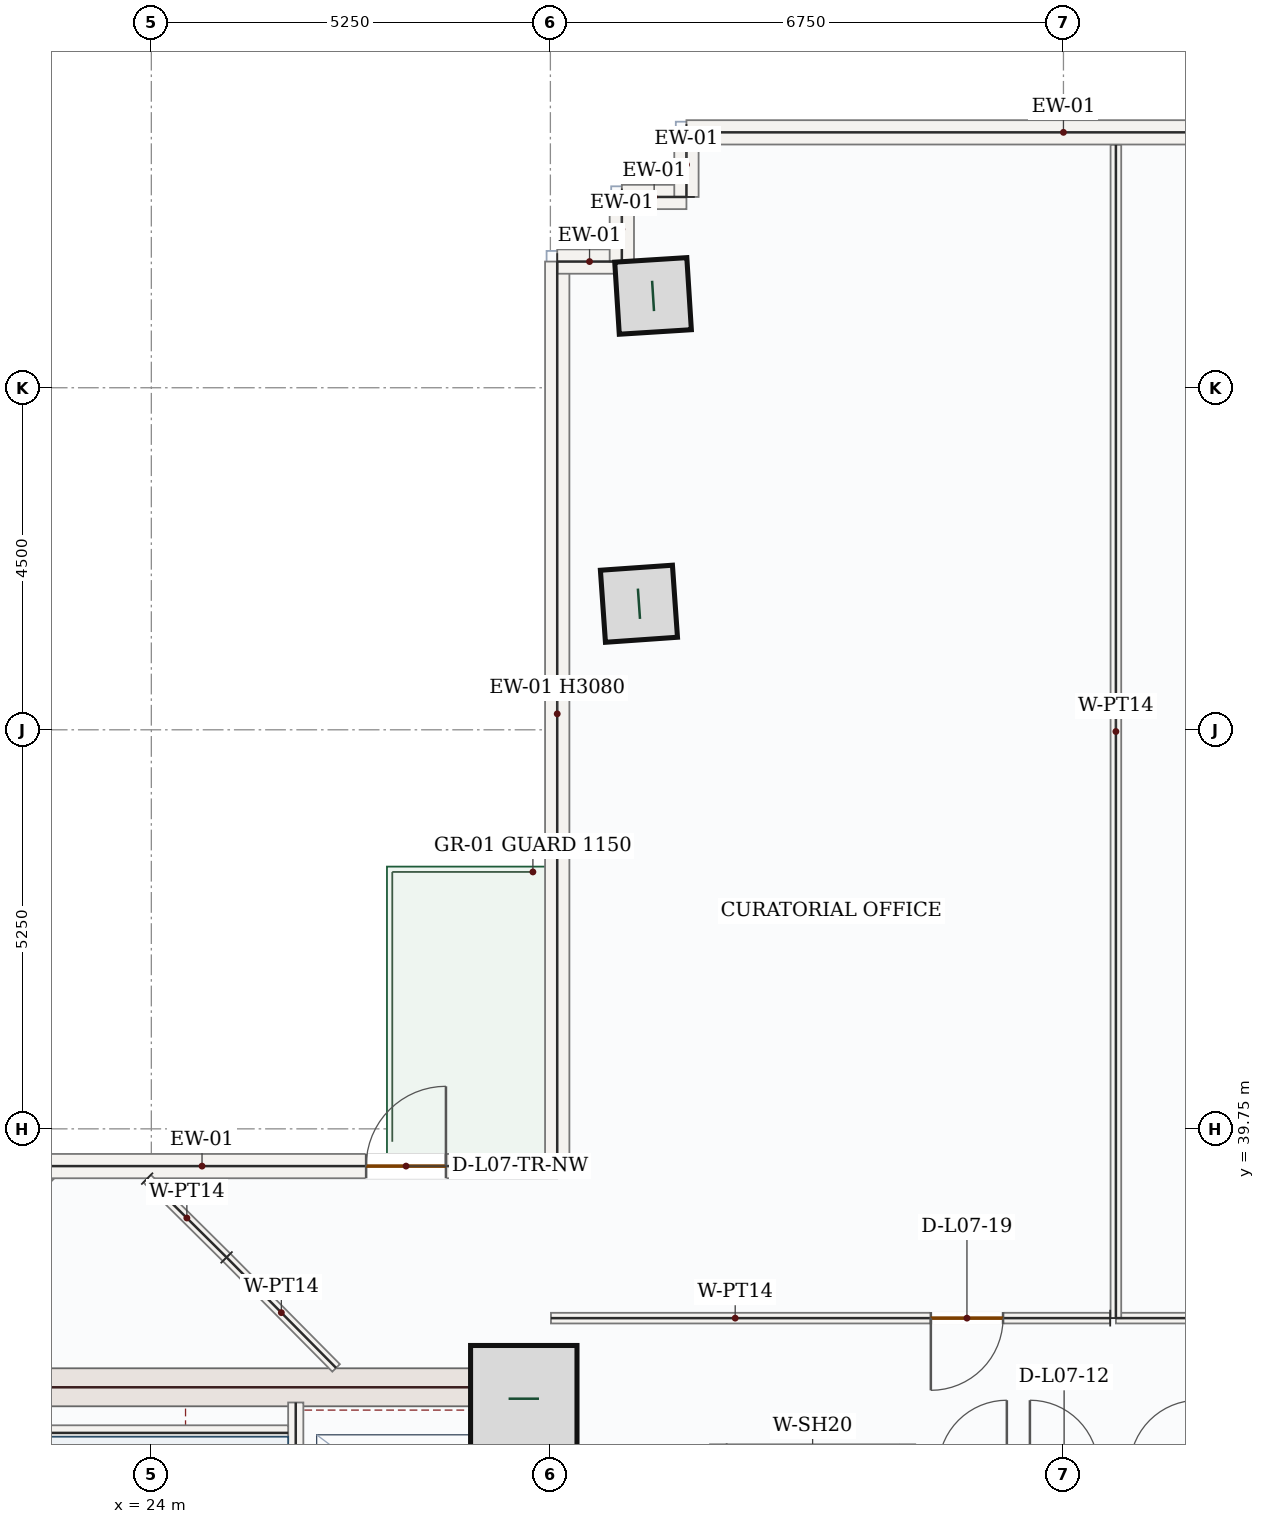
"""IFC4 building model, lengths in metres.
Left out: names, types, materials, properties, quantities, classifications, styles, units other than length and angle.
Written with IfcOpenShell. Run it as: python <this file> out.ifc"""

import sys

from ifc_helpers import new_model, si_unit, direction, frame, frame_2d, origin, origin_2d, place, context, subcontext, project, spatial, rectangle, hollow_rectangle, extrude, source, transform, mapped, element, fill, save


model = new_model("IFC4")
c1 = context("Model", 3, precision=1e-05, world=origin(), true_north=direction((0.0, 1.0)))
c2 = subcontext(c1, "Body", "Model", "MODEL_VIEW")
j1 = project(units=[si_unit("LENGTHUNIT", "METRE"), si_unit("PLANEANGLEUNIT", "RADIAN")], contexts=[c1])
p1 = place(None, origin())
s1 = spatial("IfcSite", under=j1, at=p1, CompositionType="ELEMENT")
p2 = place(p1, origin())
s2 = spatial("IfcBuilding", under=s1, at=p2, CompositionType="ELEMENT")
p3 = place(p2, frame((0.0, 0.0, 37.5)))
s3 = spatial("IfcBuildingStorey", under=s2, at=p3, CompositionType="ELEMENT", Elevation=37.5)
p4 = place(p3, frame((29.0, 28.05, 0.0), z_axis=(0.0, 0.0, 1.0), x_axis=(0.0, 1.0, 0.0)))
e1 = element("IfcWall", 1, at=p4, inside=s3, PredefinedType="SHEAR", context=c2, shape_type="SweptSolid", body=[
    extrude(rectangle(XDim=8.55, YDim=0.5, at=frame_2d((4.275, 0.0))), origin(), (0.0, 0.0, 1.0), 3.95),
])
p5 = place(p4, frame((1.5, 0.0, 0.0)))
e2 = element("IfcOpeningElement", 2, at=p5, cuts=e1, PredefinedType="OPENING", context=c2, shape_type="SweptSolid", body=[
    extrude(rectangle(XDim=1.1, YDim=2.2, at=frame_2d((0.55, 1.1))), frame((0.0, 0.26, 0.0), z_axis=(0.0, -1.0, 0.0), x_axis=(1.0, 0.0, 0.0)), (0.0, 0.0, 1.0), 0.52),
])
m1 = source(origin(), c2, "Body", "SweptSolid", [
    extrude(rectangle(XDim=7.0, YDim=0.5, at=frame_2d((3.5, 0.0))), origin(), (0.0, 0.0, 1.0), 3.95),
])
p6 = place(p3, frame((21.75, 36.35, 0.0), z_axis=(0.0, 0.0, 1.0), x_axis=(1.0, 0.0, 0.0)))
e3 = element("IfcWall", 3, at=p6, inside=s3, PredefinedType="SHEAR", context=c2, shape_type="MappedRepresentation", body=[
    mapped(m1, transform((0.0, 0.0, 0.0), x_axis=(1.0, 0.0, 0.0), y_axis=(0.0, 1.0, 0.0), z_axis=(0.0, 0.0, 1.0), scale=1.0)),
])
m2 = source(origin(), c2, "Body", "SweptSolid", [
    extrude(rectangle(XDim=1.4, YDim=1.4, at=origin_2d()), origin(), (0.0, 0.0, 1.0), 4.2),
])
p7 = place(p3, frame((28.9, 36.2, 0.0), z_axis=(0.0, 0.0, 1.0), x_axis=(1.0, 0.0, 0.0)))
e4 = element("IfcColumn", 4, at=p7, inside=s3, PredefinedType="COLUMN", context=c2, shape_type="MappedRepresentation", body=[
    mapped(m2, transform((0.0, 0.0, 0.0), x_axis=(1.0, 0.0, 0.0), y_axis=(0.0, 1.0, 0.0), z_axis=(0.0, 0.0, 1.0), scale=1.0)),
])
m3 = source(origin(), c2, "Body", "SweptSolid", [
    extrude(hollow_rectangle(XDim=0.95, YDim=0.95, WallThickness=0.05, at=origin_2d()), origin(), (0.0, 0.0, 1.0), 4.2),
])
for number, where, z_axis, x_axis in (
    (5, (30.415, 46.658, 0.0), (0.0, 0.0, 1.0), (-0.07, 0.998, 0.0)),
    (6, (30.601, 50.708, 0.0), (0.0, 0.0, 1.0), (-0.063, 0.998, 0.0)),
):
    element("IfcColumn", number, at=place(p3, frame(where, z_axis=z_axis, x_axis=x_axis)), inside=s3, PredefinedType="COLUMN", context=c2, shape_type="MappedRepresentation", body=[
        mapped(m3, transform((0.0, 0.0, 0.0), x_axis=(1.0, 0.0, 0.0), y_axis=(0.0, 1.0, 0.0), z_axis=(0.0, 0.0, 1.0), scale=1.0)),
    ])
m4 = source(origin(), c2, "Body", "SweptSolid", [
    extrude(rectangle(XDim=5.258, YDim=0.32, at=frame_2d((2.629, 0.0))), origin(), (0.0, 0.0, 1.0), 3.95),
])
p8 = place(p3, frame((18.94, 35.542, 0.0), z_axis=(0.0, 0.0, 1.0), x_axis=(0.707106781187, 0.707106781187, 0.0)))
e7 = element("IfcWall", 7, at=p8, inside=s3, PredefinedType="SOLIDWALL", context=c2, shape_type="MappedRepresentation", body=[
    mapped(m4, transform((0.0, 0.0, 0.0), x_axis=(1.0, 0.0, 0.0), y_axis=(0.0, 1.0, 0.0), z_axis=(0.0, 0.0, 1.0), scale=1.0)),
])
p9 = place(p3, frame((22.658, 39.26, 0.0), z_axis=(0.0, 0.0, 1.0), x_axis=(1.0, 0.0, 0.0)))
e8 = element("IfcWall", 8, at=p9, inside=s3, PredefinedType="SOLIDWALL", context=c2, shape_type="SweptSolid", body=[
    extrude(rectangle(XDim=6.682, YDim=0.32, at=frame_2d((3.341, 0.0))), origin(), (0.0, 0.0, 1.0), 3.95),
])
p10 = place(p9, frame((4.168, 0.0, 0.0)))
e9 = element("IfcOpeningElement", 9, at=p10, cuts=e8, PredefinedType="OPENING", context=c2, shape_type="SweptSolid", body=[
    extrude(rectangle(XDim=1.05, YDim=2.15, at=frame_2d((0.525, 1.075))), frame((0.0, 0.17, 0.0), z_axis=(0.0, -1.0, 0.0), x_axis=(1.0, 0.0, 0.0)), (0.0, 0.0, 1.0), 0.34),
])
m5 = source(origin(), c2, "Body", "SweptSolid", [
    extrude(rectangle(XDim=11.9, YDim=0.32, at=frame_2d((5.95, 0.0))), origin(), (0.0, 0.0, 1.0), 3.08),
])
p11 = place(p3, frame((29.34, 39.26, 0.0), z_axis=(0.0, 0.0, 1.0), x_axis=(0.0, 1.0, 0.0)))
e10 = element("IfcWall", 10, at=p11, inside=s3, PredefinedType="SOLIDWALL", context=c2, shape_type="MappedRepresentation", body=[
    mapped(m5, transform((0.0, 0.0, 0.0), x_axis=(1.0, 0.0, 0.0), y_axis=(0.0, 1.0, 0.0), z_axis=(0.0, 0.0, 1.0), scale=1.0)),
])
m6 = source(origin(), c2, "Body", "SweptSolid", [
    extrude(rectangle(XDim=0.85, YDim=0.32, at=frame_2d((0.425, 0.0))), origin(), (0.0, 0.0, 1.0), 3.95),
])
p12 = place(p3, frame((29.34, 51.16, 0.0), z_axis=(0.0, 0.0, 1.0), x_axis=(1.0, 0.0, 0.0)))
e11 = element("IfcWall", 11, at=p12, inside=s3, PredefinedType="SOLIDWALL", context=c2, shape_type="MappedRepresentation", body=[
    mapped(m6, transform((0.0, 0.0, 0.0), x_axis=(1.0, 0.0, 0.0), y_axis=(0.0, 1.0, 0.0), z_axis=(0.0, 0.0, 1.0), scale=1.0)),
])
m7 = source(origin(), c2, "Body", "SweptSolid", [
    extrude(rectangle(XDim=0.85, YDim=0.32, at=frame_2d((0.425, 0.0))), origin(), (0.0, 0.0, 1.0), 3.95),
])
for number, where, z_axis, x_axis in (
    (12, (30.19, 51.16, 0.0), (0.0, 0.0, 1.0), (0.0, 1.0, 0.0)),
    (13, (30.19, 52.01, 0.0), (0.0, 0.0, 1.0), (1.0, 0.0, 0.0)),
    (14, (31.04, 52.01, 0.0), (0.0, 0.0, 1.0), (0.0, 1.0, 0.0)),
):
    element("IfcWall", number, at=place(p3, frame(where, z_axis=z_axis, x_axis=x_axis)), inside=s3, PredefinedType="SOLIDWALL", context=c2, shape_type="MappedRepresentation", body=[
        mapped(m7, transform((0.0, 0.0, 0.0), x_axis=(1.0, 0.0, 0.0), y_axis=(0.0, 1.0, 0.0), z_axis=(0.0, 0.0, 1.0), scale=1.0)),
    ])
m8 = source(origin(), c2, "Body", "SweptSolid", [
    extrude(rectangle(XDim=9.92, YDim=0.32, at=frame_2d((4.96, 0.0))), origin(), (0.0, 0.0, 1.0), 3.95),
])
p13 = place(p3, frame((31.04, 52.86, 0.0), z_axis=(0.0, 0.0, 1.0), x_axis=(1.0, 0.0, 0.0)))
e15 = element("IfcWall", 15, at=p13, inside=s3, PredefinedType="SOLIDWALL", context=c2, shape_type="MappedRepresentation", body=[
    mapped(m8, transform((0.0, 0.0, 0.0), x_axis=(1.0, 0.0, 0.0), y_axis=(0.0, 1.0, 0.0), z_axis=(0.0, 0.0, 1.0), scale=1.0)),
])
p14 = place(p3, frame((25.9, 28.15, 0.0), z_axis=(0.0, 0.0, 1.0), x_axis=(0.0, 1.0, 0.0)))
e16 = element("IfcWall", 16, at=p14, inside=s3, PredefinedType="SOLIDWALL", context=c2, shape_type="SweptSolid", body=[
    extrude(rectangle(XDim=8.0, YDim=0.2, at=frame_2d((4.0, 0.0))), origin(), (0.0, 0.0, 1.0), 3.95),
])
p15 = place(p14, frame((0.4, 0.0, 0.0)))
e17 = element("IfcOpeningElement", 17, at=p15, cuts=e16, PredefinedType="OPENING", context=c2, shape_type="SweptSolid", body=[
    extrude(rectangle(XDim=1.05, YDim=2.15, at=frame_2d((0.525, 1.075))), frame((0.0, 0.11, 0.0), z_axis=(0.0, -1.0, 0.0), x_axis=(1.0, 0.0, 0.0)), (0.0, 0.0, 1.0), 0.22),
])
m9 = source(origin(), c2, "Body", "SweptSolid", [
    extrude(rectangle(XDim=3.25, YDim=0.2, at=frame_2d((1.625, 0.0))), origin(), (0.0, 0.0, 1.0), 3.95),
])
p16 = place(p3, frame((22.55, 35.75, 0.0), z_axis=(0.0, 0.0, 1.0), x_axis=(1.0, 0.0, 0.0)))
e18 = element("IfcWall", 18, at=p16, inside=s3, PredefinedType="SOLIDWALL", context=c2, shape_type="MappedRepresentation", body=[
    mapped(m9, transform((0.0, 0.0, 0.0), x_axis=(1.0, 0.0, 0.0), y_axis=(0.0, 1.0, 0.0), z_axis=(0.0, 0.0, 1.0), scale=1.0)),
])
m10 = source(origin(), c2, "Body", "SweptSolid", [
    extrude(rectangle(XDim=2.4, YDim=0.2, at=frame_2d((1.2, 0.0))), origin(), (0.0, 0.0, 1.0), 3.95),
])
for number, where, z_axis, x_axis in (
    (19, (31.45, 33.2, 0.0), (0.0, 0.0, 1.0), (0.0, 1.0, 0.0)),
    (20, (33.95, 33.2, 0.0), (0.0, 0.0, 1.0), (0.0, 1.0, 0.0)),
):
    element("IfcWall", number, at=place(p3, frame(where, z_axis=z_axis, x_axis=x_axis)), inside=s3, PredefinedType="SOLIDWALL", context=c2, shape_type="MappedRepresentation", body=[
        mapped(m10, transform((0.0, 0.0, 0.0), x_axis=(1.0, 0.0, 0.0), y_axis=(0.0, 1.0, 0.0), z_axis=(0.0, 0.0, 1.0), scale=1.0)),
    ])
m11 = source(origin(), c2, "Body", "SweptSolid", [
    extrude(rectangle(XDim=1.471, YDim=0.14, at=frame_2d((0.736, 0.0))), origin(), (0.0, 0.0, 1.0), 3.95),
])
p17 = place(p3, frame((23.945, 39.095, 0.0), z_axis=(0.0, 0.0, 1.0), x_axis=(0.710417151562, -0.703780840011, 0.0)))
e21 = element("IfcWall", 21, at=p17, inside=s3, PredefinedType="PARTITIONING", context=c2, shape_type="MappedRepresentation", body=[
    mapped(m11, transform((0.0, 0.0, 0.0), x_axis=(1.0, 0.0, 0.0), y_axis=(0.0, 1.0, 0.0), z_axis=(0.0, 0.0, 1.0), scale=1.0)),
])
m12 = source(origin(), c2, "Body", "SweptSolid", [
    extrude(rectangle(XDim=2.047, YDim=0.14, at=frame_2d((1.024, 0.0))), origin(), (0.0, 0.0, 1.0), 3.95),
])
p18 = place(p3, frame((24.99, 38.059, 0.0), z_axis=(0.0, 0.0, 1.0), x_axis=(0.703819772346, -0.710378580797, 0.0)))
e22 = element("IfcWall", 22, at=p18, inside=s3, PredefinedType="PARTITIONING", context=c2, shape_type="MappedRepresentation", body=[
    mapped(m12, transform((0.0, 0.0, 0.0), x_axis=(1.0, 0.0, 0.0), y_axis=(0.0, 1.0, 0.0), z_axis=(0.0, 0.0, 1.0), scale=1.0)),
])
p19 = place(p3, frame((42.742, 37.26, 0.0), z_axis=(0.0, 0.0, 1.0), x_axis=(-0.999999999186, 4.0337219e-05, 0.0)))
e23 = element("IfcWall", 23, at=p19, inside=s3, PredefinedType="PARTITIONING", context=c2, shape_type="SweptSolid", body=[
    extrude(rectangle(XDim=6.052, YDim=0.14, at=frame_2d((3.026, 0.0))), origin(), (0.0, 0.0, 1.0), 3.95),
])
p20 = place(p19, frame((3.98, 0.0, 0.0)))
e24 = element("IfcOpeningElement", 24, at=p20, cuts=e23, PredefinedType="OPENING", context=c2, shape_type="SweptSolid", body=[
    extrude(rectangle(XDim=0.95, YDim=2.15, at=frame_2d((0.475, 1.075))), frame((0.0, 0.08, 0.0), z_axis=(0.0, -1.0, 0.0), x_axis=(1.0, 0.0, 0.0)), (0.0, 0.0, 1.0), 0.16),
])
m13 = source(origin(), c2, "Body", "SweptSolid", [
    extrude(rectangle(XDim=15.435, YDim=0.14, at=frame_2d((7.718, 0.0))), origin(), (0.0, 0.0, 1.0), 3.95),
])
p21 = place(p3, frame((36.69, 37.26, 0.0), z_axis=(0.0, 0.0, 1.0), x_axis=(0.0, 1.0, 0.0)))
e25 = element("IfcWall", 25, at=p21, inside=s3, PredefinedType="PARTITIONING", context=c2, shape_type="MappedRepresentation", body=[
    mapped(m13, transform((0.0, 0.0, 0.0), x_axis=(1.0, 0.0, 0.0), y_axis=(0.0, 1.0, 0.0), z_axis=(0.0, 0.0, 1.0), scale=1.0)),
])
p22 = place(p3, frame((36.615, 37.26, 0.0), z_axis=(0.0, 0.0, 1.0), x_axis=(-0.999999999449, -3.3182904e-05, 0.0)))
e26 = element("IfcWall", 26, at=p22, inside=s3, PredefinedType="PARTITIONING", context=c2, shape_type="SweptSolid", body=[
    extrude(rectangle(XDim=7.357, YDim=0.14, at=frame_2d((3.679, 0.0))), origin(), (0.0, 0.0, 1.0), 3.95),
])
p23 = place(p22, frame((1.41, 0.0, 0.0)))
e27 = element("IfcOpeningElement", 27, at=p23, cuts=e26, PredefinedType="OPENING", context=c2, shape_type="SweptSolid", body=[
    extrude(rectangle(XDim=0.95, YDim=2.15, at=frame_2d((0.475, 1.075))), frame((0.0, 0.08, 0.0), z_axis=(0.0, -1.0, 0.0), x_axis=(1.0, 0.0, 0.0)), (0.0, 0.0, 1.0), 0.16),
])
m14 = source(origin(), c2, "Body", "SweptSolid", [
    extrude(rectangle(XDim=1.05, YDim=2.15, at=frame_2d((0.525, 1.075))), frame((0.0, 0.025, 0.0), z_axis=(0.0, -1.0, 0.0), x_axis=(1.0, 0.0, 0.0)), (0.0, 0.0, 1.0), 0.05),
])
p24 = place(p10, origin())
e28 = element("IfcDoor", 28, at=p24, inside=s3, OperationType="SINGLE_SWING_RIGHT", PredefinedType="DOOR", context=c2, shape_type="MappedRepresentation", body=[
    mapped(m14, transform((0.0, 0.0, 0.0), x_axis=(1.0, 0.0, 0.0), y_axis=(0.0, 1.0, 0.0), z_axis=(0.0, 0.0, 1.0), scale=1.0)),
])
fill(e9, e28)
m15 = source(origin(), c2, "Body", "SweptSolid", [
    extrude(rectangle(XDim=0.95, YDim=2.15, at=frame_2d((0.475, 1.075))), frame((0.0, 0.025, 0.0), z_axis=(0.0, -1.0, 0.0), x_axis=(1.0, 0.0, 0.0)), (0.0, 0.0, 1.0), 0.05),
])
p25 = place(p23, origin())
e29 = element("IfcDoor", 29, at=p25, inside=s3, OperationType="SINGLE_SWING_RIGHT", PredefinedType="DOOR", context=c2, shape_type="MappedRepresentation", body=[
    mapped(m15, transform((0.0, 0.0, 0.0), x_axis=(1.0, 0.0, 0.0), y_axis=(0.0, 1.0, 0.0), z_axis=(0.0, 0.0, 1.0), scale=1.0)),
])
fill(e27, e29)
save(model, sys.argv[1])
